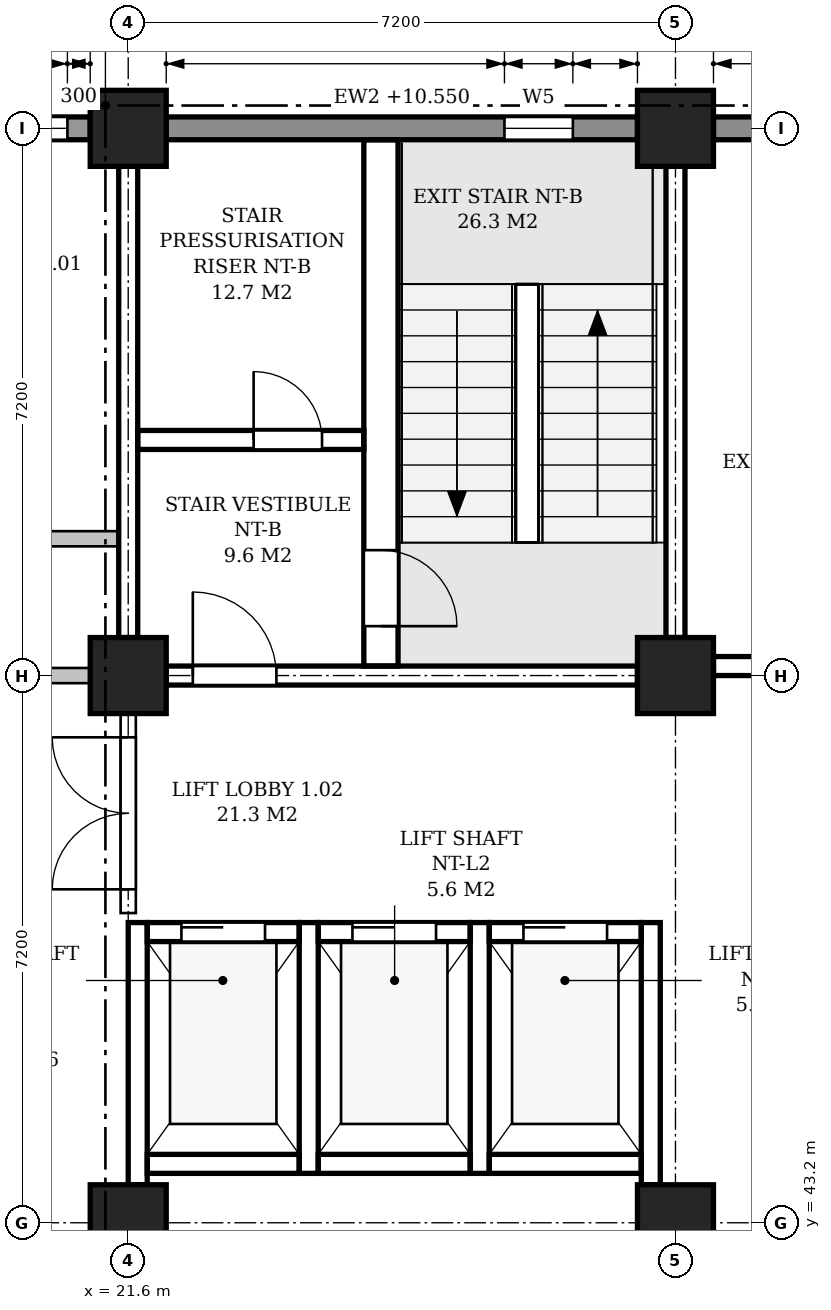
"""IFC4 building model, lengths in metres.
Left out: names, types, materials, properties, quantities, classifications, styles, units other than length and angle.
Written with IfcOpenShell. Run it as: python <this file> out.ifc"""

import sys

from ifc_helpers import new_model, si_unit, direction, frame, frame_2d, origin, origin_2d, place, context, subcontext, project, spatial, polyline, rectangle, outline, extrude, element, fill, save


model = new_model("IFC4")
c1 = context("Model", 3, precision=1e-05, world=origin(), true_north=direction((0.0, 1.0)))
c2 = subcontext(c1, "Body", "Model", "MODEL_VIEW")
j1 = project(units=[si_unit("LENGTHUNIT", "METRE"), si_unit("PLANEANGLEUNIT", "RADIAN")], contexts=[c1])
p1 = place(None, origin())
s1 = spatial("IfcSite", under=j1, at=p1, CompositionType="ELEMENT")
p2 = place(p1, origin())
s2 = spatial("IfcBuilding", under=s1, at=p2, CompositionType="ELEMENT")
p3 = place(p2, frame((0.0, 0.0, 6.0)))
s3 = spatial("IfcBuildingStorey", under=s2, at=p3, CompositionType="ELEMENT", Elevation=6.0)
for number, where, z_axis, x_axis in (
    (1, (21.6, 43.2, 0.0), (0.0, 0.0, 1.0), (1.0, 0.0, 0.0)),
    (2, (21.6, 50.4, 0.0), (0.0, 0.0, 1.0), (1.0, 0.0, 0.0)),
    (3, (21.6, 57.6, 0.0), (0.0, 0.0, 1.0), (1.0, 0.0, 0.0)),
    (4, (28.8, 43.2, 0.0), (0.0, 0.0, 1.0), (1.0, 0.0, 0.0)),
    (5, (28.8, 50.4, 0.0), (0.0, 0.0, 1.0), (1.0, 0.0, 0.0)),
    (6, (28.8, 57.6, 0.0), (0.0, 0.0, 1.0), (1.0, 0.0, 0.0)),
):
    element("IfcColumn", number, at=place(p3, frame(where, z_axis=z_axis, x_axis=x_axis)), inside=s3, PredefinedType="COLUMN", context=c2, shape_type="SweptSolid", body=[
        extrude(rectangle(XDim=1.0, YDim=1.0, at=origin_2d()), origin(), (0.0, 0.0, 1.0), 5.4),
    ])
p4 = place(p3, frame((35.575, 57.6, 0.0), z_axis=(0.0, 0.0, 1.0), x_axis=(-1.0, 0.0, 0.0)))
e7 = element("IfcWall", 7, at=p4, inside=s3, PredefinedType="STANDARD", context=c2, shape_type="SweptSolid", body=[
    extrude(rectangle(XDim=6.275, YDim=0.3, at=frame_2d((3.137, 0.0))), origin(), (0.0, 0.0, 1.0), 4.7),
])
p5 = place(p4, frame((4.525, 0.0, 0.9)))
e8 = element("IfcOpeningElement", 8, at=p5, cuts=e7, PredefinedType="OPENING", context=c2, shape_type="SweptSolid", body=[
    extrude(outline(polyline([(0.0, 0.0), (0.9, 0.0), (0.9, 3.15), (0.45, 3.6), (0.0, 3.15), (0.0, 0.0)])), frame((0.0, 0.16, 0.0), z_axis=(0.0, -1.0, 0.0), x_axis=(1.0, 0.0, 0.0)), (0.0, 0.0, 1.0), 0.32),
])
p6 = place(p3, frame((28.3, 57.6, 0.0), z_axis=(0.0, 0.0, 1.0), x_axis=(-1.0, 0.0, 0.0)))
e9 = element("IfcWall", 9, at=p6, inside=s3, PredefinedType="STANDARD", context=c2, shape_type="SweptSolid", body=[
    extrude(rectangle(XDim=6.2, YDim=0.3, at=frame_2d((3.1, 0.0))), origin(), (0.0, 0.0, 1.0), 4.55),
])
p7 = place(p6, frame((0.85, 0.0, 0.9)))
e10 = element("IfcOpeningElement", 10, at=p7, cuts=e9, PredefinedType="OPENING", context=c2, shape_type="SweptSolid", body=[
    extrude(outline(polyline([(0.0, 0.0), (0.9, 0.0), (0.9, 3.15), (0.45, 3.6), (0.0, 3.15), (0.0, 0.0)])), frame((0.0, 0.16, 0.0), z_axis=(0.0, -1.0, 0.0), x_axis=(1.0, 0.0, 0.0)), (0.0, 0.0, 1.0), 0.32),
])
p8 = place(p3, frame((21.1, 57.6, 0.0), z_axis=(0.0, 0.0, 1.0), x_axis=(-1.0, 0.0, 0.0)))
e11 = element("IfcWall", 11, at=p8, inside=s3, PredefinedType="STANDARD", context=c2, shape_type="SweptSolid", body=[
    extrude(rectangle(XDim=6.2, YDim=0.3, at=frame_2d((3.1, 0.0))), origin(), (0.0, 0.0, 1.0), 4.55),
])
p9 = place(p8, frame((0.3, 0.0, 0.9)))
e12 = element("IfcOpeningElement", 12, at=p9, cuts=e11, PredefinedType="OPENING", context=c2, shape_type="SweptSolid", body=[
    extrude(outline(polyline([(0.0, 0.0), (0.85, 0.0), (0.85, 3.15), (0.425, 3.6), (0.0, 3.15), (0.0, 0.0)])), frame((0.0, 0.16, 0.0), z_axis=(0.0, -1.0, 0.0), x_axis=(1.0, 0.0, 0.0)), (0.0, 0.0, 1.0), 0.32),
])
p10 = place(p8, frame((1.45, 0.0, 0.9)))
e13 = element("IfcOpeningElement", 13, at=p10, cuts=e11, PredefinedType="OPENING", context=c2, shape_type="SweptSolid", body=[
    extrude(outline(polyline([(0.0, 0.0), (0.85, 0.0), (0.85, 3.15), (0.425, 3.6), (0.0, 3.15), (0.0, 0.0)])), frame((0.0, 0.16, 0.0), z_axis=(0.0, -1.0, 0.0), x_axis=(1.0, 0.0, 0.0)), (0.0, 0.0, 1.0), 0.32),
])
p11 = place(p8, frame((3.9, 0.0, 0.9)))
e14 = element("IfcOpeningElement", 14, at=p11, cuts=e11, PredefinedType="OPENING", context=c2, shape_type="SweptSolid", body=[
    extrude(outline(polyline([(0.0, 0.0), (0.85, 0.0), (0.85, 3.15), (0.425, 3.6), (0.0, 3.15), (0.0, 0.0)])), frame((0.0, 0.16, 0.0), z_axis=(0.0, -1.0, 0.0), x_axis=(1.0, 0.0, 0.0)), (0.0, 0.0, 1.0), 0.32),
])
p12 = place(p8, frame((5.05, 0.0, 0.9)))
e15 = element("IfcOpeningElement", 15, at=p12, cuts=e11, PredefinedType="OPENING", context=c2, shape_type="SweptSolid", body=[
    extrude(outline(polyline([(0.0, 0.0), (0.85, 0.0), (0.85, 3.15), (0.425, 3.6), (0.0, 3.15), (0.0, 0.0)])), frame((0.0, 0.16, 0.0), z_axis=(0.0, -1.0, 0.0), x_axis=(1.0, 0.0, 0.0)), (0.0, 0.0, 1.0), 0.32),
])
p13 = place(p3, frame((29.3, 50.525, 0.0), z_axis=(0.0, 0.0, 1.0), x_axis=(1.0, 0.0, 0.0)))
e16 = element("IfcWall", 16, at=p13, inside=s3, PredefinedType="SHEAR", context=c2, shape_type="SweptSolid", body=[
    extrude(rectangle(XDim=6.275, YDim=0.25, at=frame_2d((3.137, 0.0))), origin(), (0.0, 0.0, 1.0), 4.7),
])
p14 = place(p3, frame((28.8, 50.9, -0.25), z_axis=(0.0, 0.0, 1.0), x_axis=(0.0, 1.0, 0.0)))
e17 = element("IfcWall", 17, at=p14, inside=s3, PredefinedType="SHEAR", context=c2, shape_type="SweptSolid", body=[
    extrude(rectangle(XDim=6.2, YDim=0.25, at=frame_2d((3.1, 0.0))), origin(), (0.0, 0.0, 1.0), 4.8),
])
p15 = place(p3, frame((22.1, 50.4, 0.0), z_axis=(0.0, 0.0, 1.0), x_axis=(1.0, 0.0, 0.0)))
e18 = element("IfcWall", 18, at=p15, inside=s3, PredefinedType="SHEAR", context=c2, shape_type="SweptSolid", body=[
    extrude(rectangle(XDim=6.2, YDim=0.25, at=frame_2d((3.1, 0.0))), origin(), (0.0, 0.0, 1.0), 4.4),
])
p16 = place(p15, frame((0.35, 0.0, 0.0)))
e19 = element("IfcOpeningElement", 19, at=p16, cuts=e18, PredefinedType="OPENING", context=c2, shape_type="SweptSolid", body=[
    extrude(rectangle(XDim=1.1, YDim=2.1, at=frame_2d((0.55, 1.05))), frame((0.0, 0.135, 0.0), z_axis=(0.0, -1.0, 0.0), x_axis=(1.0, 0.0, 0.0)), (0.0, 0.0, 1.0), 0.27),
])
p17 = place(p3, frame((21.6, 50.9, 0.0), z_axis=(0.0, 0.0, 1.0), x_axis=(0.0, 1.0, 0.0)))
e20 = element("IfcWall", 20, at=p17, inside=s3, PredefinedType="SHEAR", context=c2, shape_type="SweptSolid", body=[
    extrude(rectangle(XDim=6.2, YDim=0.25, at=frame_2d((3.1, 0.0))), origin(), (0.0, 0.0, 1.0), 4.4),
])
p18 = place(p3, frame((24.925, 50.525, 0.0), z_axis=(0.0, 0.0, 1.0), x_axis=(0.0, 1.0, 0.0)))
e21 = element("IfcWall", 21, at=p18, inside=s3, PredefinedType="SHEAR", context=c2, shape_type="SweptSolid", body=[
    extrude(rectangle(XDim=6.925, YDim=0.45, at=frame_2d((3.462, 0.0))), origin(), (0.0, 0.0, 1.0), 5.15),
])
p19 = place(p18, frame((0.525, 0.0, 0.0)))
e22 = element("IfcOpeningElement", 22, at=p19, cuts=e21, PredefinedType="OPENING", context=c2, shape_type="SweptSolid", body=[
    extrude(rectangle(XDim=1.0, YDim=2.1, at=frame_2d((0.5, 1.05))), frame((0.0, 0.235, 0.0), z_axis=(0.0, -1.0, 0.0), x_axis=(1.0, 0.0, 0.0)), (0.0, 0.0, 1.0), 0.47),
])
p20 = place(p3, frame((21.725, 53.5, 0.0), z_axis=(0.0, 0.0, 1.0), x_axis=(1.0, 0.0, 0.0)))
e23 = element("IfcWall", 23, at=p20, inside=s3, PredefinedType="SHEAR", context=c2, shape_type="SweptSolid", body=[
    extrude(rectangle(XDim=2.975, YDim=0.25, at=frame_2d((1.487, 0.0))), origin(), (0.0, 0.0, 1.0), 5.15),
])
p21 = place(p20, frame((1.525, 0.0, 0.0)))
e24 = element("IfcOpeningElement", 24, at=p21, cuts=e23, PredefinedType="OPENING", context=c2, shape_type="SweptSolid", body=[
    extrude(rectangle(XDim=0.9, YDim=2.1, at=frame_2d((0.45, 1.05))), frame((0.0, 0.135, 0.0), z_axis=(0.0, -1.0, 0.0), x_axis=(1.0, 0.0, 0.0)), (0.0, 0.0, 1.0), 0.27),
])
p22 = place(p3, frame((21.725, 43.7, -0.25), z_axis=(0.0, 0.0, 1.0), x_axis=(0.0, 1.0, 0.0)))
e25 = element("IfcWall", 25, at=p22, inside=s3, PredefinedType="SHEAR", context=c2, shape_type="SweptSolid", body=[
    extrude(rectangle(XDim=3.45, YDim=0.25, at=frame_2d((1.725, 0.0))), origin(), (0.0, 0.0, 1.0), 4.65),
])
for number, where, z_axis, x_axis in (
    (26, (23.975, 43.85, -0.25), (0.0, 0.0, 1.0), (0.0, 1.0, 0.0)),
    (27, (26.225, 43.85, -0.25), (0.0, 0.0, 1.0), (0.0, 1.0, 0.0)),
):
    element("IfcWall", number, at=place(p3, frame(where, z_axis=z_axis, x_axis=x_axis)), inside=s3, PredefinedType="SHEAR", context=c2, shape_type="SweptSolid", body=[
        extrude(rectangle(XDim=3.3, YDim=0.25, at=frame_2d((1.65, 0.0))), origin(), (0.0, 0.0, 1.0), 5.4),
    ])
p23 = place(p3, frame((28.475, 43.7, -0.25), z_axis=(0.0, 0.0, 1.0), x_axis=(0.0, 1.0, 0.0)))
e28 = element("IfcWall", 28, at=p23, inside=s3, PredefinedType="SHEAR", context=c2, shape_type="SweptSolid", body=[
    extrude(rectangle(XDim=3.45, YDim=0.25, at=frame_2d((1.725, 0.0))), origin(), (0.0, 0.0, 1.0), 5.4),
])
p24 = place(p3, frame((21.85, 47.025, -0.25), z_axis=(0.0, 0.0, 1.0), x_axis=(1.0, 0.0, 0.0)))
e29 = element("IfcWall", 29, at=p24, inside=s3, PredefinedType="SHEAR", context=c2, shape_type="SweptSolid", body=[
    extrude(rectangle(XDim=2.0, YDim=0.25, at=frame_2d((1.0, 0.0))), origin(), (0.0, 0.0, 1.0), 5.4),
])
p25 = place(p24, frame((0.45, 0.0, 0.25)))
e30 = element("IfcOpeningElement", 30, at=p25, cuts=e29, PredefinedType="OPENING", context=c2, shape_type="SweptSolid", body=[
    extrude(rectangle(XDim=1.1, YDim=2.1, at=frame_2d((0.55, 1.05))), frame((0.0, 0.135, 0.0), z_axis=(0.0, -1.0, 0.0), x_axis=(1.0, 0.0, 0.0)), (0.0, 0.0, 1.0), 0.27),
])
p26 = place(p3, frame((21.85, 43.975, -0.25), z_axis=(0.0, 0.0, 1.0), x_axis=(1.0, 0.0, 0.0)))
e31 = element("IfcWall", 31, at=p26, inside=s3, PredefinedType="SHEAR", context=c2, shape_type="SweptSolid", body=[
    extrude(rectangle(XDim=2.0, YDim=0.25, at=frame_2d((1.0, 0.0))), origin(), (0.0, 0.0, 1.0), 5.4),
])
p27 = place(p3, frame((24.1, 47.025, -0.25), z_axis=(0.0, 0.0, 1.0), x_axis=(1.0, 0.0, 0.0)))
e32 = element("IfcWall", 32, at=p27, inside=s3, PredefinedType="SHEAR", context=c2, shape_type="SweptSolid", body=[
    extrude(rectangle(XDim=2.0, YDim=0.25, at=frame_2d((1.0, 0.0))), origin(), (0.0, 0.0, 1.0), 5.4),
])
p28 = place(p27, frame((0.45, 0.0, 0.25)))
e33 = element("IfcOpeningElement", 33, at=p28, cuts=e32, PredefinedType="OPENING", context=c2, shape_type="SweptSolid", body=[
    extrude(rectangle(XDim=1.1, YDim=2.1, at=frame_2d((0.55, 1.05))), frame((0.0, 0.135, 0.0), z_axis=(0.0, -1.0, 0.0), x_axis=(1.0, 0.0, 0.0)), (0.0, 0.0, 1.0), 0.27),
])
p29 = place(p3, frame((24.1, 43.975, -0.25), z_axis=(0.0, 0.0, 1.0), x_axis=(1.0, 0.0, 0.0)))
e34 = element("IfcWall", 34, at=p29, inside=s3, PredefinedType="SHEAR", context=c2, shape_type="SweptSolid", body=[
    extrude(rectangle(XDim=2.0, YDim=0.25, at=frame_2d((1.0, 0.0))), origin(), (0.0, 0.0, 1.0), 5.4),
])
p30 = place(p3, frame((26.35, 47.025, -0.25), z_axis=(0.0, 0.0, 1.0), x_axis=(1.0, 0.0, 0.0)))
e35 = element("IfcWall", 35, at=p30, inside=s3, PredefinedType="SHEAR", context=c2, shape_type="SweptSolid", body=[
    extrude(rectangle(XDim=2.0, YDim=0.25, at=frame_2d((1.0, 0.0))), origin(), (0.0, 0.0, 1.0), 5.4),
])
p31 = place(p30, frame((0.45, 0.0, 0.25)))
e36 = element("IfcOpeningElement", 36, at=p31, cuts=e35, PredefinedType="OPENING", context=c2, shape_type="SweptSolid", body=[
    extrude(rectangle(XDim=1.1, YDim=2.1, at=frame_2d((0.55, 1.05))), frame((0.0, 0.135, 0.0), z_axis=(0.0, -1.0, 0.0), x_axis=(1.0, 0.0, 0.0)), (0.0, 0.0, 1.0), 0.27),
])
p32 = place(p3, frame((26.35, 43.975, -0.25), z_axis=(0.0, 0.0, 1.0), x_axis=(1.0, 0.0, 0.0)))
e37 = element("IfcWall", 37, at=p32, inside=s3, PredefinedType="SHEAR", context=c2, shape_type="SweptSolid", body=[
    extrude(rectangle(XDim=2.0, YDim=0.25, at=frame_2d((1.0, 0.0))), origin(), (0.0, 0.0, 1.0), 5.4),
])
p33 = place(p2, origin())
s4 = spatial("IfcBuildingStorey", under=s2, at=p33, CompositionType="ELEMENT", Elevation=0.0)
p34 = place(p33, frame((29.3, 50.2, 0.0), z_axis=(0.0, 0.0, 1.0), x_axis=(1.0, 0.0, 0.0)))
e38 = element("IfcWall", 38, at=p34, inside=s4, PredefinedType="SOLIDWALL", context=c2, shape_type="SweptSolid", body=[
    extrude(rectangle(XDim=6.275, YDim=0.4, at=frame_2d((3.137, 0.0))), origin(), (0.0, 0.0, 1.0), 10.7),
])
p35 = place(p33, frame((29.0, 43.7, 0.0), z_axis=(0.0, 0.0, 1.0), x_axis=(0.0, 1.0, 0.0)))
e39 = element("IfcWall", 39, at=p35, inside=s4, PredefinedType="SOLIDWALL", context=c2, shape_type="SweptSolid", body=[
    extrude(rectangle(XDim=6.2, YDim=0.4, at=frame_2d((3.1, 0.0))), origin(), (0.0, 0.0, 1.0), 10.55),
])
p36 = place(p3, frame((14.9, 50.4, 0.0), z_axis=(0.0, 0.0, 1.0), x_axis=(1.0, 0.0, 0.0)))
e40 = element("IfcWall", 40, at=p36, inside=s3, PredefinedType="PARTITIONING", context=c2, shape_type="SweptSolid", body=[
    extrude(rectangle(XDim=6.2, YDim=0.2, at=frame_2d((3.1, 0.0))), origin(), (0.0, 0.0, 1.0), 4.4),
])
p37 = place(p36, frame((4.15, 0.0, 0.0)))
e41 = element("IfcOpeningElement", 41, at=p37, cuts=e40, PredefinedType="OPENING", context=c2, shape_type="SweptSolid", body=[
    extrude(rectangle(XDim=1.0, YDim=2.1, at=frame_2d((0.5, 1.05))), frame((0.0, 0.11, 0.0), z_axis=(0.0, -1.0, 0.0), x_axis=(1.0, 0.0, 0.0)), (0.0, 0.0, 1.0), 0.22),
])
p38 = place(p3, frame((7.325, 52.2, 0.0), z_axis=(0.0, 0.0, 1.0), x_axis=(1.0, 0.0, 0.0)))
e42 = element("IfcWall", 42, at=p38, inside=s3, PredefinedType="PARTITIONING", context=c2, shape_type="SweptSolid", body=[
    extrude(outline(polyline([(0.0, 0.0), (14.15, 0.0), (14.15, 4.4), (14.025, 4.4), (14.025, 5.15), (7.325, 5.15), (7.325, 4.4), (6.825, 4.4), (6.825, 5.15), (0.125, 5.15), (0.125, 4.4), (0.0, 4.4), (0.0, 0.0)])), frame((0.0, 0.1, 0.0), z_axis=(0.0, -1.0, 0.0), x_axis=(1.0, 0.0, 0.0)), (0.0, 0.0, 1.0), 0.2),
])
p39 = place(p38, frame((1.238, 0.0, 0.0)))
e43 = element("IfcOpeningElement", 43, at=p39, cuts=e42, PredefinedType="OPENING", context=c2, shape_type="SweptSolid", body=[
    extrude(rectangle(XDim=1.0, YDim=2.1, at=frame_2d((0.5, 1.05))), frame((0.0, 0.11, 0.0), z_axis=(0.0, -1.0, 0.0), x_axis=(1.0, 0.0, 0.0)), (0.0, 0.0, 1.0), 0.22),
])
p40 = place(p38, frame((4.775, 0.0, 0.0)))
e44 = element("IfcOpeningElement", 44, at=p40, cuts=e42, PredefinedType="OPENING", context=c2, shape_type="SweptSolid", body=[
    extrude(rectangle(XDim=1.0, YDim=2.1, at=frame_2d((0.5, 1.05))), frame((0.0, 0.11, 0.0), z_axis=(0.0, -1.0, 0.0), x_axis=(1.0, 0.0, 0.0)), (0.0, 0.0, 1.0), 0.22),
])
p41 = place(p38, frame((8.375, 0.0, 0.0)))
e45 = element("IfcOpeningElement", 45, at=p41, cuts=e42, PredefinedType="OPENING", context=c2, shape_type="SweptSolid", body=[
    extrude(rectangle(XDim=1.0, YDim=2.1, at=frame_2d((0.5, 1.05))), frame((0.0, 0.11, 0.0), z_axis=(0.0, -1.0, 0.0), x_axis=(1.0, 0.0, 0.0)), (0.0, 0.0, 1.0), 0.22),
])
p42 = place(p38, frame((11.913, 0.0, 0.0)))
e46 = element("IfcOpeningElement", 46, at=p42, cuts=e42, PredefinedType="OPENING", context=c2, shape_type="SweptSolid", body=[
    extrude(rectangle(XDim=1.0, YDim=2.1, at=frame_2d((0.5, 1.05))), frame((0.0, 0.11, 0.0), z_axis=(0.0, -1.0, 0.0), x_axis=(1.0, 0.0, 0.0)), (0.0, 0.0, 1.0), 0.22),
])
p43 = place(p3, frame((21.6, 47.275, 0.0), z_axis=(0.0, 0.0, 1.0), x_axis=(0.0, 1.0, 0.0)))
e47 = element("IfcWall", 47, at=p43, inside=s3, PredefinedType="PARTITIONING", context=c2, shape_type="SweptSolid", body=[
    extrude(rectangle(XDim=2.625, YDim=0.2, at=frame_2d((1.312, 0.0))), origin(), (0.0, 0.0, 1.0), 4.4),
])
p44 = place(p43, frame((0.312, 0.0, 0.0)))
e48 = element("IfcOpeningElement", 48, at=p44, cuts=e47, PredefinedType="OPENING", context=c2, shape_type="SweptSolid", body=[
    extrude(rectangle(XDim=2.0, YDim=2.4, at=frame_2d((1.0, 1.2))), frame((0.0, 0.11, 0.0), z_axis=(0.0, -1.0, 0.0), x_axis=(1.0, 0.0, 0.0)), (0.0, 0.0, 1.0), 0.22),
])
p45 = place(p7, origin())
e49 = element("IfcWindow", 49, at=p45, inside=s3, PartitioningType="SINGLE_PANEL", PredefinedType="WINDOW", context=c2, shape_type="SweptSolid", body=[
    extrude(outline(polyline([(0.0, 0.0), (0.9, 0.0), (0.9, 3.15), (0.45, 3.6), (0.0, 3.15), (0.0, 0.0)])), frame((0.0, 0.03, 0.0), z_axis=(0.0, -1.0, 0.0), x_axis=(1.0, 0.0, 0.0)), (0.0, 0.0, 1.0), 0.06),
])
fill(e10, e49)
p46 = place(p9, origin())
e50 = element("IfcWindow", 50, at=p46, inside=s3, PartitioningType="SINGLE_PANEL", PredefinedType="WINDOW", context=c2, shape_type="SweptSolid", body=[
    extrude(outline(polyline([(0.0, 0.0), (0.85, 0.0), (0.85, 3.15), (0.425, 3.6), (0.0, 3.15), (0.0, 0.0)])), frame((0.0, 0.03, 0.0), z_axis=(0.0, -1.0, 0.0), x_axis=(1.0, 0.0, 0.0)), (0.0, 0.0, 1.0), 0.06),
])
fill(e12, e50)
p47 = place(p19, frame((1.0, 0.0, 0.0), z_axis=(0.0, 0.0, 1.0), x_axis=(-1.0, 0.0, 0.0)))
e51 = element("IfcDoor", 51, at=p47, inside=s3, OperationType="SINGLE_SWING_RIGHT", PredefinedType="DOOR", context=c2, shape_type="SweptSolid", body=[
    extrude(rectangle(XDim=1.0, YDim=2.1, at=frame_2d((0.5, 1.05))), frame((0.0, 0.025, 0.0), z_axis=(0.0, -1.0, 0.0), x_axis=(1.0, 0.0, 0.0)), (0.0, 0.0, 1.0), 0.05),
])
fill(e22, e51)
p48 = place(p16, origin())
e52 = element("IfcDoor", 52, at=p48, inside=s3, OperationType="SINGLE_SWING_LEFT", PredefinedType="DOOR", context=c2, shape_type="SweptSolid", body=[
    extrude(rectangle(XDim=1.1, YDim=2.1, at=frame_2d((0.55, 1.05))), frame((0.0, 0.025, 0.0), z_axis=(0.0, -1.0, 0.0), x_axis=(1.0, 0.0, 0.0)), (0.0, 0.0, 1.0), 0.05),
])
fill(e19, e52)
p49 = place(p21, origin())
e53 = element("IfcDoor", 53, at=p49, inside=s3, OperationType="SINGLE_SWING_LEFT", PredefinedType="DOOR", context=c2, shape_type="SweptSolid", body=[
    extrude(rectangle(XDim=0.9, YDim=2.1, at=frame_2d((0.45, 1.05))), frame((0.0, 0.025, 0.0), z_axis=(0.0, -1.0, 0.0), x_axis=(1.0, 0.0, 0.0)), (0.0, 0.0, 1.0), 0.05),
])
fill(e24, e53)
p50 = place(p25, origin())
e54 = element("IfcDoor", 54, at=p50, inside=s3, OperationType="SLIDING_TO_LEFT", PredefinedType="DOOR", context=c2, shape_type="SweptSolid", body=[
    extrude(rectangle(XDim=1.1, YDim=2.1, at=frame_2d((0.55, 1.05))), frame((0.0, 0.025, 0.0), z_axis=(0.0, -1.0, 0.0), x_axis=(1.0, 0.0, 0.0)), (0.0, 0.0, 1.0), 0.05),
])
fill(e30, e54)
p51 = place(p28, origin())
e55 = element("IfcDoor", 55, at=p51, inside=s3, OperationType="SLIDING_TO_LEFT", PredefinedType="DOOR", context=c2, shape_type="SweptSolid", body=[
    extrude(rectangle(XDim=1.1, YDim=2.1, at=frame_2d((0.55, 1.05))), frame((0.0, 0.025, 0.0), z_axis=(0.0, -1.0, 0.0), x_axis=(1.0, 0.0, 0.0)), (0.0, 0.0, 1.0), 0.05),
])
fill(e33, e55)
p52 = place(p31, origin())
e56 = element("IfcDoor", 56, at=p52, inside=s3, OperationType="SLIDING_TO_LEFT", PredefinedType="DOOR", context=c2, shape_type="SweptSolid", body=[
    extrude(rectangle(XDim=1.1, YDim=2.1, at=frame_2d((0.55, 1.05))), frame((0.0, 0.025, 0.0), z_axis=(0.0, -1.0, 0.0), x_axis=(1.0, 0.0, 0.0)), (0.0, 0.0, 1.0), 0.05),
])
fill(e36, e56)
p53 = place(p44, origin())
e57 = element("IfcDoor", 57, at=p53, inside=s3, OperationType="DOUBLE_DOOR_SINGLE_SWING", PredefinedType="DOOR", context=c2, shape_type="SweptSolid", body=[
    extrude(rectangle(XDim=2.0, YDim=2.4, at=frame_2d((1.0, 1.2))), frame((0.0, 0.025, 0.0), z_axis=(0.0, -1.0, 0.0), x_axis=(1.0, 0.0, 0.0)), (0.0, 0.0, 1.0), 0.05),
])
fill(e48, e57)
save(model, sys.argv[1])
